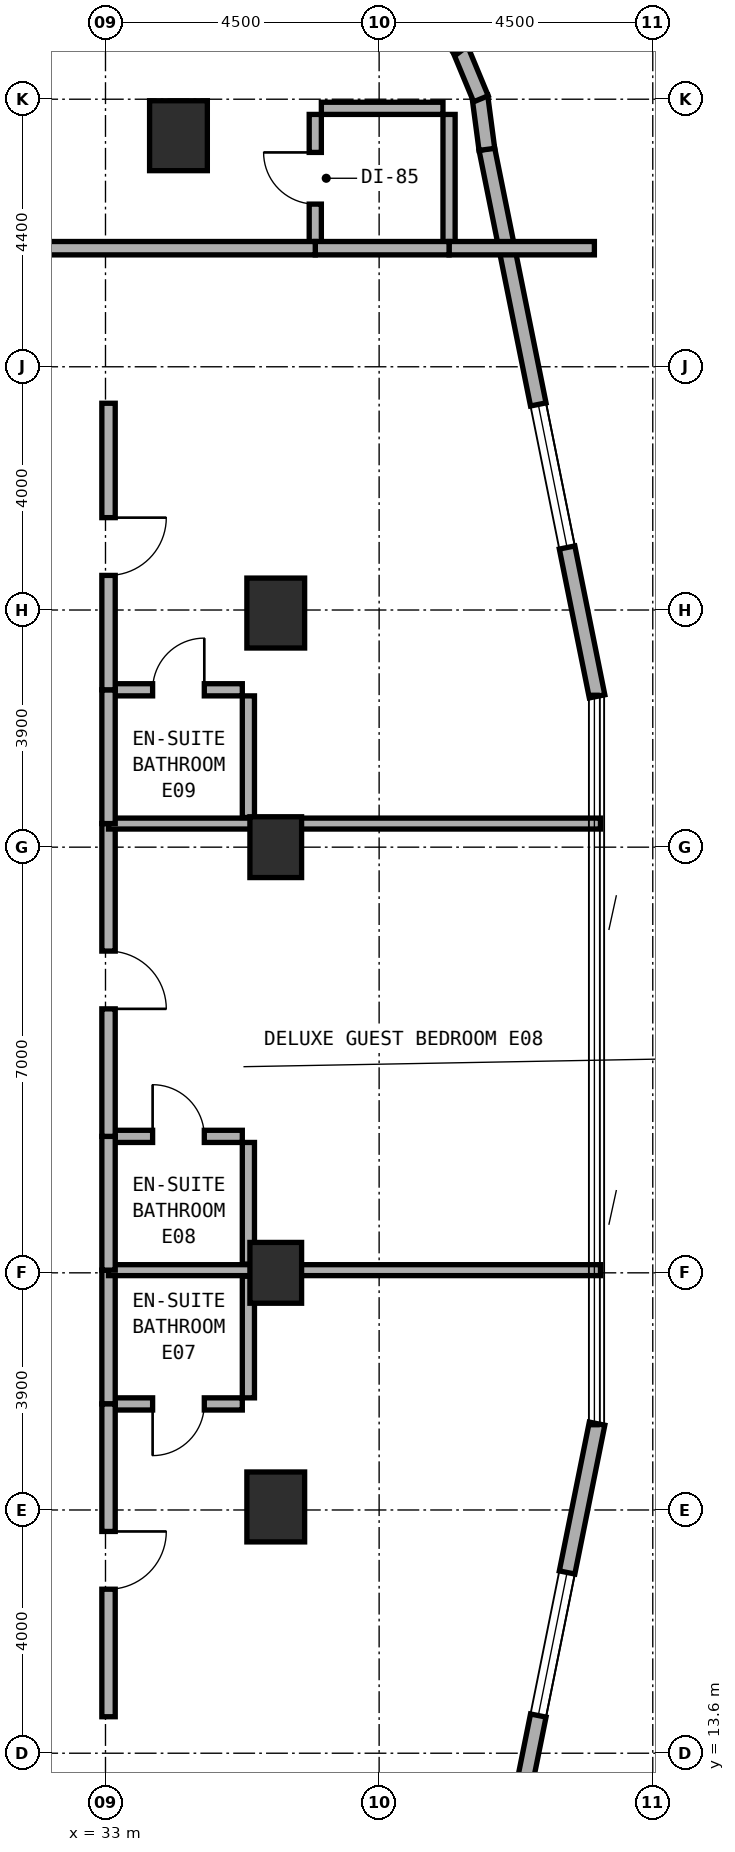
"""IFC4 building model, lengths in metres.
Left out: names, types, materials, properties, quantities, classifications, styles, units other than length and angle.
Written with IfcOpenShell. Run it as: python <this file> out.ifc"""

import sys

from ifc_helpers import new_model, si_unit, direction, frame, frame_2d, origin, origin_2d, place, context, subcontext, project, spatial, rectangle, extrude, element, fill, save


model = new_model("IFC4")
c1 = context("Model", 3, precision=1e-05, world=origin(), true_north=direction((0.0, 1.0)))
c2 = subcontext(c1, "Body", "Model", "MODEL_VIEW")
j1 = project(units=[si_unit("LENGTHUNIT", "METRE"), si_unit("PLANEANGLEUNIT", "RADIAN")], contexts=[c1])
p1 = place(None, origin())
s1 = spatial("IfcSite", under=j1, at=p1, CompositionType="ELEMENT")
p2 = place(p1, origin())
s2 = spatial("IfcBuilding", under=s1, at=p2, CompositionType="ELEMENT")
p3 = place(p2, frame((0.0, 0.0, 109.0)))
s3 = spatial("IfcBuildingStorey", under=s2, at=p3, CompositionType="ELEMENT", Elevation=109.0)
p4 = place(p3, frame((34.2, 40.2, 0.0), z_axis=(0.0, 0.0, 1.0), x_axis=(1.0, 0.0, 0.0)))
e1 = element("IfcColumn", 1, at=p4, inside=s3, PredefinedType="COLUMN", context=c2, shape_type="SweptSolid", body=[
    extrude(rectangle(XDim=0.95, YDim=1.15, at=origin_2d()), origin(), (0.0, 0.0, 1.0), 3.5),
])
for number, where, z_axis, x_axis in (
    (2, (35.8, 21.5, 0.0), (0.0, 0.0, 1.0), (1.0, 0.0, 0.0)),
    (3, (35.8, 28.5, 0.0), (0.0, 0.0, 1.0), (1.0, 0.0, 0.0)),
):
    element("IfcColumn", number, at=place(p3, frame(where, z_axis=z_axis, x_axis=x_axis)), inside=s3, PredefinedType="COLUMN", context=c2, shape_type="SweptSolid", body=[
        extrude(rectangle(XDim=0.85, YDim=1.0, at=origin_2d()), origin(), (0.0, 0.0, 1.0), 3.5),
    ])
for number, where, z_axis, x_axis in (
    (4, (35.8, 17.65, 0.0), (0.0, 0.0, 1.0), (1.0, 0.0, 0.0)),
    (5, (35.8, 32.35, 0.0), (0.0, 0.0, 1.0), (1.0, 0.0, 0.0)),
):
    element("IfcColumn", number, at=place(p3, frame(where, z_axis=z_axis, x_axis=x_axis)), inside=s3, PredefinedType="COLUMN", context=c2, shape_type="SweptSolid", body=[
        extrude(rectangle(XDim=0.95, YDim=1.15, at=origin_2d()), origin(), (0.0, 0.0, 1.0), 3.5),
    ])
p5 = place(p3, frame((39.271, 10.018, 0.0), z_axis=(0.0, 0.0, 1.0), x_axis=(0.197435082048, 0.980315963543, 0.0)))
e6 = element("IfcWall", 6, at=p5, inside=s3, PredefinedType="STANDARD", context=c2, shape_type="SweptSolid", body=[
    extrude(rectangle(XDim=9.183, YDim=0.26, at=frame_2d((4.591, 0.0))), origin(), (0.0, 0.0, 1.0), 3.22),
])
p6 = place(p5, frame((4.286, 0.0, 0.8)))
e7 = element("IfcOpeningElement", 7, at=p6, cuts=e6, PredefinedType="OPENING", context=c2, shape_type="SweptSolid", body=[
    extrude(rectangle(XDim=2.4, YDim=1.6, at=frame_2d((1.2, 0.8))), frame((0.0, 0.14, 0.0), z_axis=(0.0, -1.0, 0.0), x_axis=(1.0, 0.0, 0.0)), (0.0, 0.0, 1.0), 0.28),
])
p7 = place(p3, frame((41.084, 30.98, 0.0), z_axis=(0.0, 0.0, 1.0), x_axis=(-0.197435082048, 0.980315963543, 0.0)))
e8 = element("IfcWall", 8, at=p7, inside=s3, PredefinedType="STANDARD", context=c2, shape_type="SweptSolid", body=[
    extrude(rectangle(XDim=9.183, YDim=0.26, at=frame_2d((4.591, 0.0))), origin(), (0.0, 0.0, 1.0), 3.22),
])
p8 = place(p7, frame((2.497, 0.0, 0.8)))
e9 = element("IfcOpeningElement", 9, at=p8, cuts=e8, PredefinedType="OPENING", context=c2, shape_type="SweptSolid", body=[
    extrude(rectangle(XDim=2.4, YDim=1.6, at=frame_2d((1.2, 0.8))), frame((0.0, 0.14, 0.0), z_axis=(0.0, -1.0, 0.0), x_axis=(1.0, 0.0, 0.0)), (0.0, 0.0, 1.0), 0.28),
])
p9 = place(p3, frame((39.272, 39.975, 0.0), z_axis=(0.0, 0.0, 1.0), x_axis=(-0.130953706898, 0.991388484223, 0.0)))
e10 = element("IfcWall", 10, at=p9, inside=s3, PredefinedType="STANDARD", context=c2, shape_type="SweptSolid", body=[
    extrude(rectangle(XDim=0.885, YDim=0.26, at=frame_2d((0.443, 0.0))), origin(), (0.0, 0.0, 1.0), 3.22),
])
p10 = place(p3, frame((39.174, 40.807, 0.0), z_axis=(0.0, 0.0, 1.0), x_axis=(-0.383290660547, 0.923627776508, 0.0)))
e11 = element("IfcWall", 11, at=p10, inside=s3, PredefinedType="STANDARD", context=c2, shape_type="SweptSolid", body=[
    extrude(rectangle(XDim=0.903, YDim=0.26, at=frame_2d((0.452, 0.0))), origin(), (0.0, 0.0, 1.0), 3.22),
])
p11 = place(p3, frame((38.856, 41.601, 0.0), z_axis=(0.0, 0.0, 1.0), x_axis=(-0.608624690463, 0.793458244748, 0.0)))
e12 = element("IfcWall", 12, at=p11, inside=s3, PredefinedType="STANDARD", context=c2, shape_type="SweptSolid", body=[
    extrude(rectangle(XDim=0.902, YDim=0.26, at=frame_2d((0.451, 0.0))), origin(), (0.0, 0.0, 1.0), 3.22),
])
p12 = place(p3, frame((36.45, 38.45, 0.0), z_axis=(0.0, 0.0, 1.0), x_axis=(0.0, 1.0, 0.0)))
e13 = element("IfcWall", 13, at=p12, inside=s3, PredefinedType="PLUMBINGWALL", context=c2, shape_type="SweptSolid", body=[
    extrude(rectangle(XDim=2.1, YDim=0.2, at=frame_2d((1.05, 0.0))), origin(), (0.0, 0.0, 1.0), 3.22),
])
p13 = place(p12, frame((0.625, 0.0, 0.0)))
e14 = element("IfcOpeningElement", 14, at=p13, cuts=e13, PredefinedType="OPENING", context=c2, shape_type="SweptSolid", body=[
    extrude(rectangle(XDim=0.85, YDim=2.1, at=frame_2d((0.425, 1.05))), frame((0.0, 0.11, 0.0), z_axis=(0.0, -1.0, 0.0), x_axis=(1.0, 0.0, 0.0)), (0.0, 0.0, 1.0), 0.22),
])
p14 = place(p3, frame((36.55, 40.65, 0.0), z_axis=(0.0, 0.0, 1.0), x_axis=(1.0, 0.0, 0.0)))
e15 = element("IfcWall", 15, at=p14, inside=s3, PredefinedType="PLUMBINGWALL", context=c2, shape_type="SweptSolid", body=[
    extrude(rectangle(XDim=2.0, YDim=0.2, at=frame_2d((1.0, 0.0))), origin(), (0.0, 0.0, 1.0), 3.22),
])
p15 = place(p3, frame((38.65, 38.45, 0.0), z_axis=(0.0, 0.0, 1.0), x_axis=(0.0, 1.0, 0.0)))
e16 = element("IfcWall", 16, at=p15, inside=s3, PredefinedType="PLUMBINGWALL", context=c2, shape_type="SweptSolid", body=[
    extrude(rectangle(XDim=2.1, YDim=0.2, at=frame_2d((1.05, 0.0))), origin(), (0.0, 0.0, 1.0), 3.22),
])
p16 = place(p3, frame((38.65, 38.35, 0.0), z_axis=(0.0, 0.0, 1.0), x_axis=(1.0, 0.0, 0.0)))
e17 = element("IfcWall", 17, at=p16, inside=s3, PredefinedType="SOLIDWALL", context=c2, shape_type="SweptSolid", body=[
    extrude(rectangle(XDim=2.39, YDim=0.22, at=frame_2d((1.195, 0.0))), origin(), (0.0, 0.0, 1.0), 3.22),
])
p17 = place(p3, frame((36.45, 38.35, 0.0), z_axis=(0.0, 0.0, 1.0), x_axis=(1.0, 0.0, 0.0)))
e18 = element("IfcWall", 18, at=p17, inside=s3, PredefinedType="SOLIDWALL", context=c2, shape_type="SweptSolid", body=[
    extrude(rectangle(XDim=2.2, YDim=0.22, at=frame_2d((1.1, 0.0))), origin(), (0.0, 0.0, 1.0), 3.22),
])
p18 = place(p3, frame((25.8, 38.35, 0.0), z_axis=(0.0, 0.0, 1.0), x_axis=(1.0, 0.0, 0.0)))
e19 = element("IfcWall", 19, at=p18, inside=s3, PredefinedType="SOLIDWALL", context=c2, shape_type="SweptSolid", body=[
    extrude(rectangle(XDim=10.65, YDim=0.22, at=frame_2d((5.325, 0.0))), origin(), (0.0, 0.0, 1.0), 2.595),
])
p19 = place(p18, frame((4.85, 0.0, 0.0)))
e20 = element("IfcOpeningElement", 20, at=p19, cuts=e19, PredefinedType="OPENING", context=c2, shape_type="SweptSolid", body=[
    extrude(rectangle(XDim=0.95, YDim=2.1, at=frame_2d((0.475, 1.05))), frame((0.0, 0.12, 0.0), z_axis=(0.0, -1.0, 0.0), x_axis=(1.0, 0.0, 0.0)), (0.0, 0.0, 1.0), 0.24),
])
p20 = place(p3, frame((33.15, 19.344, 0.0), z_axis=(0.0, 0.0, 1.0), x_axis=(1.0, 0.0, 0.0)))
e21 = element("IfcWall", 21, at=p20, inside=s3, PredefinedType="PLUMBINGWALL", context=c2, shape_type="SweptSolid", body=[
    extrude(rectangle(XDim=2.1, YDim=0.2, at=frame_2d((1.05, 0.0))), origin(), (0.0, 0.0, 1.0), 3.22),
])
p21 = place(p20, frame((0.625, 0.0, 0.0)))
e22 = element("IfcOpeningElement", 22, at=p21, cuts=e21, PredefinedType="OPENING", context=c2, shape_type="SweptSolid", body=[
    extrude(rectangle(XDim=0.85, YDim=2.1, at=frame_2d((0.425, 1.05))), frame((0.0, 0.11, 0.0), z_axis=(0.0, -1.0, 0.0), x_axis=(1.0, 0.0, 0.0)), (0.0, 0.0, 1.0), 0.22),
])
p22 = place(p3, frame((35.35, 19.444, 0.0), z_axis=(0.0, 0.0, 1.0), x_axis=(0.0, 1.0, 0.0)))
e23 = element("IfcWall", 23, at=p22, inside=s3, PredefinedType="PLUMBINGWALL", context=c2, shape_type="SweptSolid", body=[
    extrude(rectangle(XDim=2.0, YDim=0.2, at=frame_2d((1.0, 0.0))), origin(), (0.0, 0.0, 1.0), 2.595),
])
p23 = place(p3, frame((33.05, 19.344, 0.0), z_axis=(0.0, 0.0, 1.0), x_axis=(0.0, 1.0, 0.0)))
e24 = element("IfcWall", 24, at=p23, inside=s3, PredefinedType="SOLIDWALL", context=c2, shape_type="SweptSolid", body=[
    extrude(rectangle(XDim=2.2, YDim=0.22, at=frame_2d((1.1, 0.0))), origin(), (0.0, 0.0, 1.0), 2.595),
])
p24 = place(p3, frame((33.05, 14.2, 0.0), z_axis=(0.0, 0.0, 1.0), x_axis=(0.0, 1.0, 0.0)))
e25 = element("IfcWall", 25, at=p24, inside=s3, PredefinedType="SOLIDWALL", context=c2, shape_type="SweptSolid", body=[
    extrude(rectangle(XDim=5.144, YDim=0.22, at=frame_2d((2.572, 0.0))), origin(), (0.0, 0.0, 1.0), 2.595),
])
p25 = place(p24, frame((2.097, 0.0, 0.0)))
e26 = element("IfcOpeningElement", 26, at=p25, cuts=e25, PredefinedType="OPENING", context=c2, shape_type="SweptSolid", body=[
    extrude(rectangle(XDim=0.95, YDim=2.1, at=frame_2d((0.475, 1.05))), frame((0.0, 0.12, 0.0), z_axis=(0.0, -1.0, 0.0), x_axis=(1.0, 0.0, 0.0)), (0.0, 0.0, 1.0), 0.24),
])
p26 = place(p3, frame((33.05, 21.544, 0.0), z_axis=(0.0, 0.0, 1.0), x_axis=(1.0, 0.0, 0.0)))
e27 = element("IfcWall", 27, at=p26, inside=s3, PredefinedType="SOLIDWALL", context=c2, shape_type="SweptSolid", body=[
    extrude(rectangle(XDim=8.09, YDim=0.18, at=frame_2d((4.045, 0.0))), origin(), (0.0, 0.0, 1.0), 2.595),
])
p27 = place(p3, frame((33.15, 23.744, 0.0), z_axis=(0.0, 0.0, 1.0), x_axis=(1.0, 0.0, 0.0)))
e28 = element("IfcWall", 28, at=p27, inside=s3, PredefinedType="PLUMBINGWALL", context=c2, shape_type="SweptSolid", body=[
    extrude(rectangle(XDim=2.1, YDim=0.2, at=frame_2d((1.05, 0.0))), origin(), (0.0, 0.0, 1.0), 3.22),
])
p28 = place(p27, frame((0.625, 0.0, 0.0)))
e29 = element("IfcOpeningElement", 29, at=p28, cuts=e28, PredefinedType="OPENING", context=c2, shape_type="SweptSolid", body=[
    extrude(rectangle(XDim=0.85, YDim=2.1, at=frame_2d((0.425, 1.05))), frame((0.0, 0.11, 0.0), z_axis=(0.0, -1.0, 0.0), x_axis=(1.0, 0.0, 0.0)), (0.0, 0.0, 1.0), 0.22),
])
p29 = place(p3, frame((35.35, 21.644, 0.0), z_axis=(0.0, 0.0, 1.0), x_axis=(0.0, 1.0, 0.0)))
e30 = element("IfcWall", 30, at=p29, inside=s3, PredefinedType="PLUMBINGWALL", context=c2, shape_type="SweptSolid", body=[
    extrude(rectangle(XDim=2.0, YDim=0.2, at=frame_2d((1.0, 0.0))), origin(), (0.0, 0.0, 1.0), 3.22),
])
p30 = place(p3, frame((33.05, 21.544, 0.0), z_axis=(0.0, 0.0, 1.0), x_axis=(0.0, 1.0, 0.0)))
e31 = element("IfcWall", 31, at=p30, inside=s3, PredefinedType="SOLIDWALL", context=c2, shape_type="SweptSolid", body=[
    extrude(rectangle(XDim=2.2, YDim=0.22, at=frame_2d((1.1, 0.0))), origin(), (0.0, 0.0, 1.0), 2.595),
])
p31 = place(p3, frame((33.05, 23.744, 0.0), z_axis=(0.0, 0.0, 1.0), x_axis=(0.0, 1.0, 0.0)))
e32 = element("IfcWall", 32, at=p31, inside=s3, PredefinedType="SOLIDWALL", context=c2, shape_type="SweptSolid", body=[
    extrude(rectangle(XDim=5.144, YDim=0.22, at=frame_2d((2.572, 0.0))), origin(), (0.0, 0.0, 1.0), 2.595),
])
p32 = place(p31, frame((2.097, 0.0, 0.0)))
e33 = element("IfcOpeningElement", 33, at=p32, cuts=e32, PredefinedType="OPENING", context=c2, shape_type="SweptSolid", body=[
    extrude(rectangle(XDim=0.95, YDim=2.1, at=frame_2d((0.475, 1.05))), frame((0.0, 0.12, 0.0), z_axis=(0.0, -1.0, 0.0), x_axis=(1.0, 0.0, 0.0)), (0.0, 0.0, 1.0), 0.24),
])
p33 = place(p3, frame((33.05, 28.888, 0.0), z_axis=(0.0, 0.0, 1.0), x_axis=(1.0, 0.0, 0.0)))
e34 = element("IfcWall", 34, at=p33, inside=s3, PredefinedType="SOLIDWALL", context=c2, shape_type="SweptSolid", body=[
    extrude(rectangle(XDim=8.09, YDim=0.18, at=frame_2d((4.045, 0.0))), origin(), (0.0, 0.0, 1.0), 2.835),
])
p34 = place(p3, frame((33.15, 31.088, 0.0), z_axis=(0.0, 0.0, 1.0), x_axis=(1.0, 0.0, 0.0)))
e35 = element("IfcWall", 35, at=p34, inside=s3, PredefinedType="PLUMBINGWALL", context=c2, shape_type="SweptSolid", body=[
    extrude(rectangle(XDim=2.1, YDim=0.2, at=frame_2d((1.05, 0.0))), origin(), (0.0, 0.0, 1.0), 3.22),
])
p35 = place(p34, frame((0.625, 0.0, 0.0)))
e36 = element("IfcOpeningElement", 36, at=p35, cuts=e35, PredefinedType="OPENING", context=c2, shape_type="SweptSolid", body=[
    extrude(rectangle(XDim=0.85, YDim=2.1, at=frame_2d((0.425, 1.05))), frame((0.0, 0.11, 0.0), z_axis=(0.0, -1.0, 0.0), x_axis=(1.0, 0.0, 0.0)), (0.0, 0.0, 1.0), 0.22),
])
p36 = place(p3, frame((35.35, 28.988, 0.0), z_axis=(0.0, 0.0, 1.0), x_axis=(0.0, 1.0, 0.0)))
e37 = element("IfcWall", 37, at=p36, inside=s3, PredefinedType="PLUMBINGWALL", context=c2, shape_type="SweptSolid", body=[
    extrude(rectangle(XDim=2.0, YDim=0.2, at=frame_2d((1.0, 0.0))), origin(), (0.0, 0.0, 1.0), 3.22),
])
p37 = place(p3, frame((33.05, 28.888, 0.0), z_axis=(0.0, 0.0, 1.0), x_axis=(0.0, 1.0, 0.0)))
e38 = element("IfcWall", 38, at=p37, inside=s3, PredefinedType="SOLIDWALL", context=c2, shape_type="SweptSolid", body=[
    extrude(rectangle(XDim=2.2, YDim=0.22, at=frame_2d((1.1, 0.0))), origin(), (0.0, 0.0, 1.0), 3.22),
])
p38 = place(p3, frame((33.05, 31.088, 0.0), z_axis=(0.0, 0.0, 1.0), x_axis=(0.0, 1.0, 0.0)))
e39 = element("IfcWall", 39, at=p38, inside=s3, PredefinedType="SOLIDWALL", context=c2, shape_type="SweptSolid", body=[
    extrude(rectangle(XDim=4.712, YDim=0.22, at=frame_2d((2.356, 0.0))), origin(), (0.0, 0.0, 1.0), 2.595),
])
p39 = place(p38, frame((1.881, 0.0, 0.0)))
e40 = element("IfcOpeningElement", 40, at=p39, cuts=e39, PredefinedType="OPENING", context=c2, shape_type="SweptSolid", body=[
    extrude(rectangle(XDim=0.95, YDim=2.1, at=frame_2d((0.475, 1.05))), frame((0.0, 0.12, 0.0), z_axis=(0.0, -1.0, 0.0), x_axis=(1.0, 0.0, 0.0)), (0.0, 0.0, 1.0), 0.24),
])
p40 = place(p6, origin())
e41 = element("IfcWindow", 41, at=p40, inside=s3, PartitioningType="SINGLE_PANEL", PredefinedType="WINDOW", context=c2, shape_type="SweptSolid", body=[
    extrude(rectangle(XDim=2.4, YDim=1.6, at=frame_2d((1.2, 0.8))), frame((0.0, 0.03, 0.0), z_axis=(0.0, -1.0, 0.0), x_axis=(1.0, 0.0, 0.0)), (0.0, 0.0, 1.0), 0.06),
])
fill(e7, e41)
p41 = place(p8, origin())
e42 = element("IfcWindow", 42, at=p41, inside=s3, PartitioningType="SINGLE_PANEL", PredefinedType="WINDOW", context=c2, shape_type="SweptSolid", body=[
    extrude(rectangle(XDim=2.4, YDim=1.6, at=frame_2d((1.2, 0.8))), frame((0.0, 0.03, 0.0), z_axis=(0.0, -1.0, 0.0), x_axis=(1.0, 0.0, 0.0)), (0.0, 0.0, 1.0), 0.06),
])
fill(e9, e42)
p42 = place(p13, origin())
e43 = element("IfcDoor", 43, at=p42, inside=s3, OperationType="SINGLE_SWING_RIGHT", PredefinedType="DOOR", context=c2, shape_type="SweptSolid", body=[
    extrude(rectangle(XDim=0.85, YDim=2.1, at=frame_2d((0.425, 1.05))), frame((0.0, 0.025, 0.0), z_axis=(0.0, -1.0, 0.0), x_axis=(1.0, 0.0, 0.0)), (0.0, 0.0, 1.0), 0.05),
])
fill(e14, e43)
p43 = place(p21, frame((0.85, 0.0, 0.0), z_axis=(0.0, 0.0, 1.0), x_axis=(-1.0, 0.0, 0.0)))
e44 = element("IfcDoor", 44, at=p43, inside=s3, OperationType="SINGLE_SWING_RIGHT", PredefinedType="DOOR", context=c2, shape_type="SweptSolid", body=[
    extrude(rectangle(XDim=0.85, YDim=2.1, at=frame_2d((0.425, 1.05))), frame((0.0, 0.025, 0.0), z_axis=(0.0, -1.0, 0.0), x_axis=(1.0, 0.0, 0.0)), (0.0, 0.0, 1.0), 0.05),
])
fill(e22, e44)
p44 = place(p25, frame((0.95, 0.0, 0.0), z_axis=(0.0, 0.0, 1.0), x_axis=(-1.0, 0.0, 0.0)))
e45 = element("IfcDoor", 45, at=p44, inside=s3, OperationType="SINGLE_SWING_LEFT", PredefinedType="DOOR", context=c2, shape_type="SweptSolid", body=[
    extrude(rectangle(XDim=0.95, YDim=2.1, at=frame_2d((0.475, 1.05))), frame((0.0, 0.025, 0.0), z_axis=(0.0, -1.0, 0.0), x_axis=(1.0, 0.0, 0.0)), (0.0, 0.0, 1.0), 0.05),
])
fill(e26, e45)
p45 = place(p28, origin())
e46 = element("IfcDoor", 46, at=p45, inside=s3, OperationType="SINGLE_SWING_LEFT", PredefinedType="DOOR", context=c2, shape_type="SweptSolid", body=[
    extrude(rectangle(XDim=0.85, YDim=2.1, at=frame_2d((0.425, 1.05))), frame((0.0, 0.025, 0.0), z_axis=(0.0, -1.0, 0.0), x_axis=(1.0, 0.0, 0.0)), (0.0, 0.0, 1.0), 0.05),
])
fill(e29, e46)
p46 = place(p32, frame((0.95, 0.0, 0.0), z_axis=(0.0, 0.0, 1.0), x_axis=(-1.0, 0.0, 0.0)))
e47 = element("IfcDoor", 47, at=p46, inside=s3, OperationType="SINGLE_SWING_RIGHT", PredefinedType="DOOR", context=c2, shape_type="SweptSolid", body=[
    extrude(rectangle(XDim=0.95, YDim=2.1, at=frame_2d((0.475, 1.05))), frame((0.0, 0.025, 0.0), z_axis=(0.0, -1.0, 0.0), x_axis=(1.0, 0.0, 0.0)), (0.0, 0.0, 1.0), 0.05),
])
fill(e33, e47)
p47 = place(p35, origin())
e48 = element("IfcDoor", 48, at=p47, inside=s3, OperationType="SINGLE_SWING_RIGHT", PredefinedType="DOOR", context=c2, shape_type="SweptSolid", body=[
    extrude(rectangle(XDim=0.85, YDim=2.1, at=frame_2d((0.425, 1.05))), frame((0.0, 0.025, 0.0), z_axis=(0.0, -1.0, 0.0), x_axis=(1.0, 0.0, 0.0)), (0.0, 0.0, 1.0), 0.05),
])
fill(e36, e48)
p48 = place(p39, frame((0.95, 0.0, 0.0), z_axis=(0.0, 0.0, 1.0), x_axis=(-1.0, 0.0, 0.0)))
e49 = element("IfcDoor", 49, at=p48, inside=s3, OperationType="SINGLE_SWING_LEFT", PredefinedType="DOOR", context=c2, shape_type="SweptSolid", body=[
    extrude(rectangle(XDim=0.95, YDim=2.1, at=frame_2d((0.475, 1.05))), frame((0.0, 0.025, 0.0), z_axis=(0.0, -1.0, 0.0), x_axis=(1.0, 0.0, 0.0)), (0.0, 0.0, 1.0), 0.05),
])
fill(e40, e49)
save(model, sys.argv[1])
